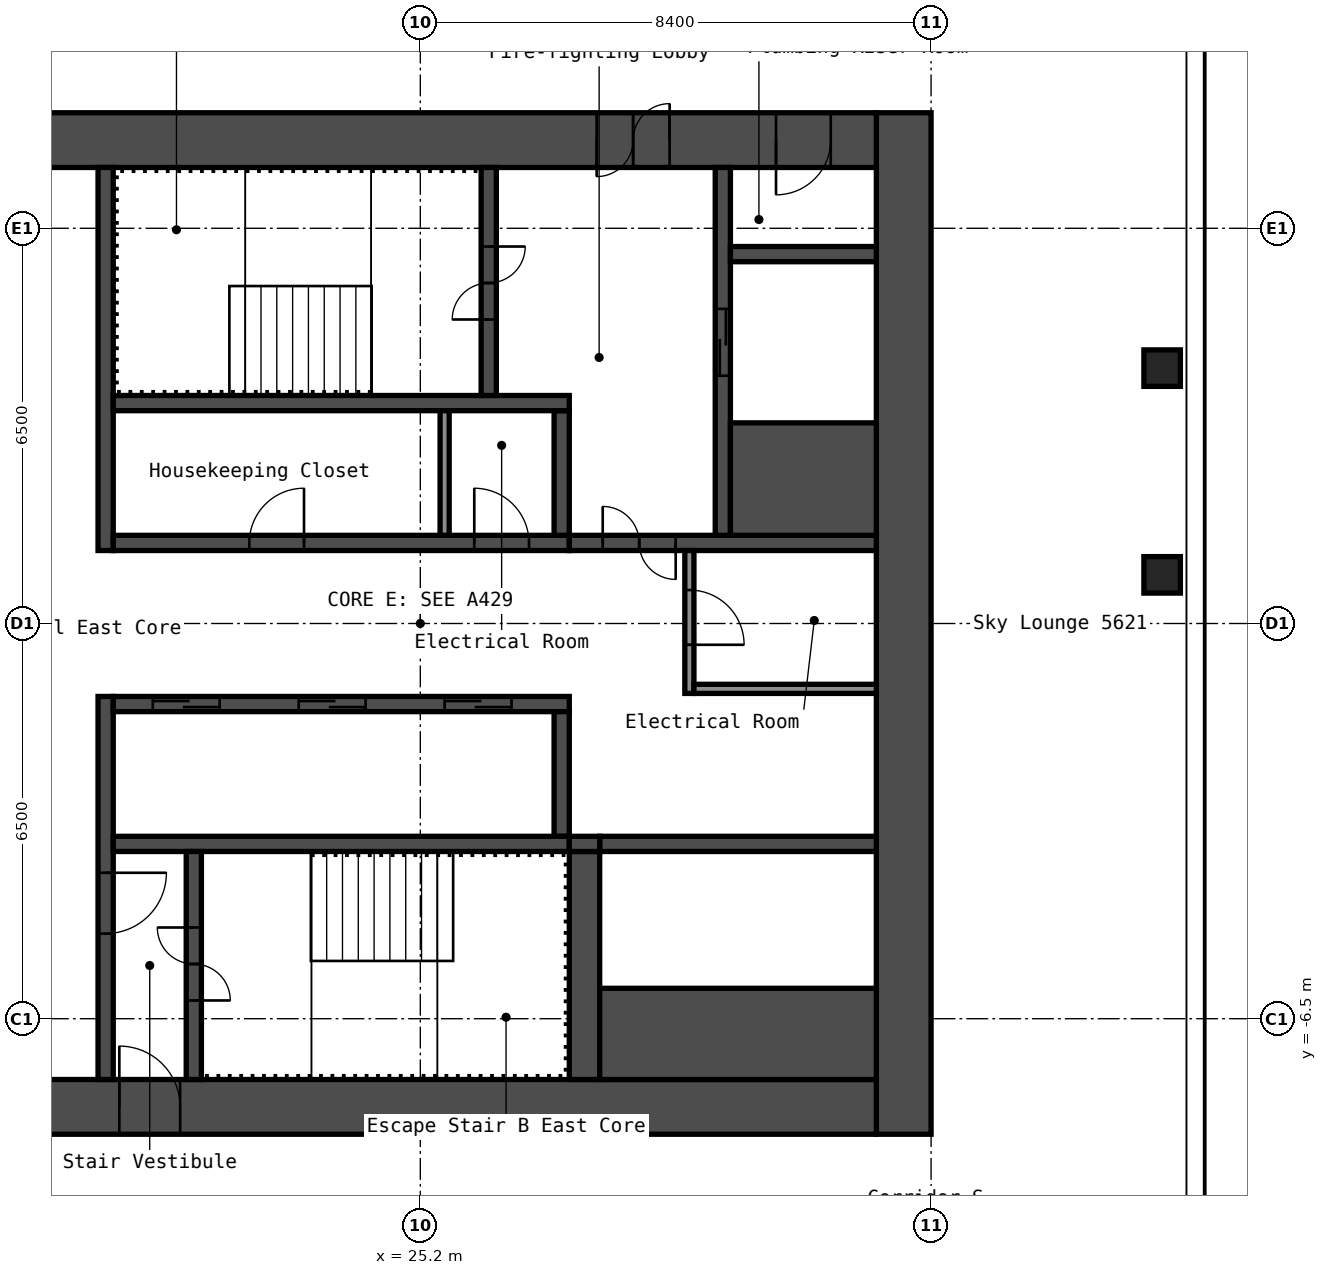
"""IFC4 building model, lengths in metres.
Left out: names, types, materials, properties, quantities, classifications, styles, units other than length and angle.
Written with IfcOpenShell. Run it as: python <this file> out.ifc"""

import sys

from ifc_helpers import new_model, si_unit, direction, frame, frame_2d, origin, origin_2d, place, context, subcontext, project, spatial, rectangle, hollow_rectangle, extrude, element, fill, save


model = new_model("IFC4")
c1 = context("Model", 3, precision=1e-05, world=origin(), true_north=direction((0.0, 1.0)))
c2 = subcontext(c1, "Body", "Model", "MODEL_VIEW")
j1 = project(units=[si_unit("LENGTHUNIT", "METRE"), si_unit("PLANEANGLEUNIT", "RADIAN")], contexts=[c1])
p1 = place(None, origin())
s1 = spatial("IfcSite", under=j1, at=p1, CompositionType="ELEMENT")
p2 = place(p1, origin())
s2 = spatial("IfcBuilding", under=s1, at=p2, CompositionType="ELEMENT")
p3 = place(p2, frame((0.0, 0.0, 199.4)))
s3 = spatial("IfcBuildingStorey", under=s2, at=p3, CompositionType="ELEMENT", Elevation=199.4)
for number, where, z_axis, x_axis in (
    (1, (37.4, 0.8, 0.0), (0.0, 0.0, 1.0), (1.0, 0.0, 0.0)),
    (2, (37.4, 4.2, 0.0), (0.0, 0.0, 1.0), (1.0, 0.0, 0.0)),
):
    element("IfcColumn", number, at=place(p3, frame(where, z_axis=z_axis, x_axis=x_axis)), inside=s3, PredefinedType="COLUMN", context=c2, shape_type="SweptSolid", body=[
        extrude(hollow_rectangle(XDim=0.6, YDim=0.6, WallThickness=0.025, InnerFilletRadius=0.038, OuterFilletRadius=0.062, at=origin_2d()), origin(), (0.0, 0.0, 1.0), 2.75),
    ])
p4 = place(p3, frame((33.15, -8.4, 0.0), z_axis=(0.0, 0.0, 1.0), x_axis=(0.0, 1.0, 0.0)))
e3 = element("IfcWall", 3, at=p4, inside=s3, PredefinedType="SHEAR", context=c2, shape_type="SweptSolid", body=[
    extrude(rectangle(XDim=16.8, YDim=0.9, at=frame_2d((8.4, 0.0))), origin(), (0.0, 0.0, 1.0), 2.75),
])
p5 = place(p3, frame((17.7, 7.95, 0.0), z_axis=(0.0, 0.0, 1.0), x_axis=(1.0, 0.0, 0.0)))
e4 = element("IfcWall", 4, at=p5, inside=s3, PredefinedType="SHEAR", context=c2, shape_type="SweptSolid", body=[
    extrude(rectangle(XDim=15.0, YDim=0.9, at=frame_2d((7.5, 0.0))), origin(), (0.0, 0.0, 1.0), 2.75),
])
p6 = place(p5, frame((10.4, 0.0, 0.0)))
e5 = element("IfcOpeningElement", 5, at=p6, cuts=e4, PredefinedType="OPENING", context=c2, shape_type="SweptSolid", body=[
    extrude(rectangle(XDim=1.2, YDim=2.1, at=frame_2d((0.6, 1.05))), frame((0.0, 0.46, 0.0), z_axis=(0.0, -1.0, 0.0), x_axis=(1.0, 0.0, 0.0)), (0.0, 0.0, 1.0), 0.92),
])
p7 = place(p5, frame((13.35, 0.0, 0.0)))
e6 = element("IfcOpeningElement", 6, at=p7, cuts=e4, PredefinedType="OPENING", context=c2, shape_type="SweptSolid", body=[
    extrude(rectangle(XDim=0.9, YDim=2.1, at=frame_2d((0.45, 1.05))), frame((0.0, 0.46, 0.0), z_axis=(0.0, -1.0, 0.0), x_axis=(1.0, 0.0, 0.0)), (0.0, 0.0, 1.0), 0.92),
])
p8 = place(p3, frame((17.7, -7.95, 0.0), z_axis=(0.0, 0.0, 1.0), x_axis=(1.0, 0.0, 0.0)))
e7 = element("IfcWall", 7, at=p8, inside=s3, PredefinedType="SHEAR", context=c2, shape_type="SweptSolid", body=[
    extrude(rectangle(XDim=15.0, YDim=0.9, at=frame_2d((7.5, 0.0))), origin(), (0.0, 0.0, 1.0), 2.75),
])
p9 = place(p8, frame((2.55, 0.0, 0.0)))
e8 = element("IfcOpeningElement", 8, at=p9, cuts=e7, PredefinedType="OPENING", context=c2, shape_type="SweptSolid", body=[
    extrude(rectangle(XDim=1.0, YDim=2.1, at=frame_2d((0.5, 1.05))), frame((0.0, 0.46, 0.0), z_axis=(0.0, -1.0, 0.0), x_axis=(1.0, 0.0, 0.0)), (0.0, 0.0, 1.0), 0.92),
])
p10 = place(p3, frame((20.025, 1.2, 0.0), z_axis=(0.0, 0.0, 1.0), x_axis=(0.0, 1.0, 0.0)))
e9 = element("IfcWall", 9, at=p10, inside=s3, PredefinedType="SHEAR", context=c2, shape_type="SweptSolid", body=[
    extrude(rectangle(XDim=6.3, YDim=0.25, at=frame_2d((3.15, 0.0))), origin(), (0.0, 0.0, 1.0), 2.75),
])
p11 = place(p3, frame((20.025, -7.5, 0.0), z_axis=(0.0, 0.0, 1.0), x_axis=(0.0, 1.0, 0.0)))
e10 = element("IfcWall", 10, at=p11, inside=s3, PredefinedType="SHEAR", context=c2, shape_type="SweptSolid", body=[
    extrude(rectangle(XDim=6.3, YDim=0.25, at=frame_2d((3.15, 0.0))), origin(), (0.0, 0.0, 1.0), 2.75),
])
p12 = place(p11, frame((2.4, 0.0, 0.0)))
e11 = element("IfcOpeningElement", 11, at=p12, cuts=e10, PredefinedType="OPENING", context=c2, shape_type="SweptSolid", body=[
    extrude(rectangle(XDim=1.0, YDim=2.1, at=frame_2d((0.5, 1.05))), frame((0.0, 0.135, 0.0), z_axis=(0.0, -1.0, 0.0), x_axis=(1.0, 0.0, 0.0)), (0.0, 0.0, 1.0), 0.27),
])
p13 = place(p3, frame((20.15, 1.325, 0.0), z_axis=(0.0, 0.0, 1.0), x_axis=(1.0, 0.0, 0.0)))
e12 = element("IfcWall", 12, at=p13, inside=s3, PredefinedType="SHEAR", context=c2, shape_type="SweptSolid", body=[
    extrude(rectangle(XDim=7.5, YDim=0.25, at=frame_2d((3.75, 0.0))), origin(), (0.0, 0.0, 1.0), 2.75),
])
p14 = place(p13, frame((2.238, 0.0, 0.0)))
e13 = element("IfcOpeningElement", 13, at=p14, cuts=e12, PredefinedType="OPENING", context=c2, shape_type="SweptSolid", body=[
    extrude(rectangle(XDim=0.9, YDim=2.1, at=frame_2d((0.45, 1.05))), frame((0.0, 0.135, 0.0), z_axis=(0.0, -1.0, 0.0), x_axis=(1.0, 0.0, 0.0)), (0.0, 0.0, 1.0), 0.27),
])
p15 = place(p13, frame((5.938, 0.0, 0.0)))
e14 = element("IfcOpeningElement", 14, at=p15, cuts=e12, PredefinedType="OPENING", context=c2, shape_type="SweptSolid", body=[
    extrude(rectangle(XDim=0.9, YDim=2.1, at=frame_2d((0.45, 1.05))), frame((0.0, 0.135, 0.0), z_axis=(0.0, -1.0, 0.0), x_axis=(1.0, 0.0, 0.0)), (0.0, 0.0, 1.0), 0.27),
])
p16 = place(p3, frame((27.525, 1.45, 0.0), z_axis=(0.0, 0.0, 1.0), x_axis=(0.0, 1.0, 0.0)))
e15 = element("IfcWall", 15, at=p16, inside=s3, PredefinedType="SHEAR", context=c2, shape_type="SweptSolid", body=[
    extrude(rectangle(XDim=2.05, YDim=0.25, at=frame_2d((1.025, 0.0))), origin(), (0.0, 0.0, 1.0), 2.75),
])
p17 = place(p3, frame((20.15, 3.625, 0.0), z_axis=(0.0, 0.0, 1.0), x_axis=(1.0, 0.0, 0.0)))
e16 = element("IfcWall", 16, at=p17, inside=s3, PredefinedType="SHEAR", context=c2, shape_type="SweptSolid", body=[
    extrude(rectangle(XDim=7.5, YDim=0.25, at=frame_2d((3.75, 0.0))), origin(), (0.0, 0.0, 1.0), 2.75),
])
p18 = place(p3, frame((26.325, 3.75, 0.0), z_axis=(0.0, 0.0, 1.0), x_axis=(0.0, 1.0, 0.0)))
e17 = element("IfcWall", 17, at=p18, inside=s3, PredefinedType="SHEAR", context=c2, shape_type="SweptSolid", body=[
    extrude(rectangle(XDim=3.75, YDim=0.25, at=frame_2d((1.875, 0.0))), origin(), (0.0, 0.0, 1.0), 2.75),
])
p19 = place(p18, frame((1.25, 0.0, 0.0)))
e18 = element("IfcOpeningElement", 18, at=p19, cuts=e17, PredefinedType="OPENING", context=c2, shape_type="SweptSolid", body=[
    extrude(rectangle(XDim=1.2, YDim=2.1, at=frame_2d((0.6, 1.05))), frame((0.0, 0.135, 0.0), z_axis=(0.0, -1.0, 0.0), x_axis=(1.0, 0.0, 0.0)), (0.0, 0.0, 1.0), 0.27),
])
p20 = place(p3, frame((27.65, 1.325, 0.0), z_axis=(0.0, 0.0, 1.0), x_axis=(1.0, 0.0, 0.0)))
e19 = element("IfcWall", 19, at=p20, inside=s3, PredefinedType="SHEAR", context=c2, shape_type="SweptSolid", body=[
    extrude(rectangle(XDim=5.05, YDim=0.25, at=frame_2d((2.525, 0.0))), origin(), (0.0, 0.0, 1.0), 2.75),
])
p21 = place(p20, frame((0.55, 0.0, 0.0)))
e20 = element("IfcOpeningElement", 20, at=p21, cuts=e19, PredefinedType="OPENING", context=c2, shape_type="SweptSolid", body=[
    extrude(rectangle(XDim=1.2, YDim=2.1, at=frame_2d((0.6, 1.05))), frame((0.0, 0.135, 0.0), z_axis=(0.0, -1.0, 0.0), x_axis=(1.0, 0.0, 0.0)), (0.0, 0.0, 1.0), 0.27),
])
p22 = place(p3, frame((30.175, 1.45, 0.0), z_axis=(0.0, 0.0, 1.0), x_axis=(0.0, 1.0, 0.0)))
e21 = element("IfcWall", 21, at=p22, inside=s3, PredefinedType="SHEAR", context=c2, shape_type="SweptSolid", body=[
    extrude(rectangle(XDim=6.05, YDim=0.25, at=frame_2d((3.025, 0.0))), origin(), (0.0, 0.0, 1.0), 2.75),
])
p23 = place(p22, frame((2.625, 0.0, 0.0)))
e22 = element("IfcOpeningElement", 22, at=p23, cuts=e21, PredefinedType="OPENING", context=c2, shape_type="SweptSolid", body=[
    extrude(rectangle(XDim=1.1, YDim=2.1, at=frame_2d((0.55, 1.05))), frame((0.0, 0.135, 0.0), z_axis=(0.0, -1.0, 0.0), x_axis=(1.0, 0.0, 0.0)), (0.0, 0.0, 1.0), 0.27),
])
p24 = place(p3, frame((30.3, 2.375, 0.0), z_axis=(0.0, 0.0, 1.0), x_axis=(1.0, 0.0, 0.0)))
e23 = element("IfcWall", 23, at=p24, inside=s3, PredefinedType="SHEAR", context=c2, shape_type="SweptSolid", body=[
    extrude(rectangle(XDim=2.4, YDim=1.85, at=frame_2d((1.2, 0.0))), origin(), (0.0, 0.0, 1.0), 2.75),
])
p25 = place(p3, frame((30.3, 6.075, 0.0), z_axis=(0.0, 0.0, 1.0), x_axis=(1.0, 0.0, 0.0)))
e24 = element("IfcWall", 24, at=p25, inside=s3, PredefinedType="SHEAR", context=c2, shape_type="SweptSolid", body=[
    extrude(rectangle(XDim=2.4, YDim=0.25, at=frame_2d((1.2, 0.0))), origin(), (0.0, 0.0, 1.0), 2.75),
])
p26 = place(p3, frame((20.15, -1.325, 0.0), z_axis=(0.0, 0.0, 1.0), x_axis=(1.0, 0.0, 0.0)))
e25 = element("IfcWall", 25, at=p26, inside=s3, PredefinedType="SHEAR", context=c2, shape_type="SweptSolid", body=[
    extrude(rectangle(XDim=7.5, YDim=0.25, at=frame_2d((3.75, 0.0))), origin(), (0.0, 0.0, 1.0), 2.75),
])
p27 = place(p26, frame((0.65, 0.0, 0.0)))
e26 = element("IfcOpeningElement", 26, at=p27, cuts=e25, PredefinedType="OPENING", context=c2, shape_type="SweptSolid", body=[
    extrude(rectangle(XDim=1.1, YDim=2.1, at=frame_2d((0.55, 1.05))), frame((0.0, 0.135, 0.0), z_axis=(0.0, -1.0, 0.0), x_axis=(1.0, 0.0, 0.0)), (0.0, 0.0, 1.0), 0.27),
])
p28 = place(p26, frame((3.05, 0.0, 0.0)))
e27 = element("IfcOpeningElement", 27, at=p28, cuts=e25, PredefinedType="OPENING", context=c2, shape_type="SweptSolid", body=[
    extrude(rectangle(XDim=1.1, YDim=2.1, at=frame_2d((0.55, 1.05))), frame((0.0, 0.135, 0.0), z_axis=(0.0, -1.0, 0.0), x_axis=(1.0, 0.0, 0.0)), (0.0, 0.0, 1.0), 0.27),
])
p29 = place(p26, frame((5.45, 0.0, 0.0)))
e28 = element("IfcOpeningElement", 28, at=p29, cuts=e25, PredefinedType="OPENING", context=c2, shape_type="SweptSolid", body=[
    extrude(rectangle(XDim=1.1, YDim=2.1, at=frame_2d((0.55, 1.05))), frame((0.0, 0.135, 0.0), z_axis=(0.0, -1.0, 0.0), x_axis=(1.0, 0.0, 0.0)), (0.0, 0.0, 1.0), 0.27),
])
p30 = place(p3, frame((27.525, -3.5, 0.0), z_axis=(0.0, 0.0, 1.0), x_axis=(0.0, 1.0, 0.0)))
e29 = element("IfcWall", 29, at=p30, inside=s3, PredefinedType="SHEAR", context=c2, shape_type="SweptSolid", body=[
    extrude(rectangle(XDim=2.05, YDim=0.25, at=frame_2d((1.025, 0.0))), origin(), (0.0, 0.0, 1.0), 2.75),
])
p31 = place(p3, frame((20.15, -3.625, 0.0), z_axis=(0.0, 0.0, 1.0), x_axis=(1.0, 0.0, 0.0)))
e30 = element("IfcWall", 30, at=p31, inside=s3, PredefinedType="SHEAR", context=c2, shape_type="SweptSolid", body=[
    extrude(rectangle(XDim=7.5, YDim=0.25, at=frame_2d((3.75, 0.0))), origin(), (0.0, 0.0, 1.0), 2.75),
])
p32 = place(p3, frame((21.475, -7.5, 0.0), z_axis=(0.0, 0.0, 1.0), x_axis=(0.0, 1.0, 0.0)))
e31 = element("IfcWall", 31, at=p32, inside=s3, PredefinedType="SHEAR", context=c2, shape_type="SweptSolid", body=[
    extrude(rectangle(XDim=3.75, YDim=0.25, at=frame_2d((1.875, 0.0))), origin(), (0.0, 0.0, 1.0), 2.75),
])
p33 = place(p32, frame((1.3, 0.0, 0.0)))
e32 = element("IfcOpeningElement", 32, at=p33, cuts=e31, PredefinedType="OPENING", context=c2, shape_type="SweptSolid", body=[
    extrude(rectangle(XDim=1.2, YDim=2.1, at=frame_2d((0.6, 1.05))), frame((0.0, 0.135, 0.0), z_axis=(0.0, -1.0, 0.0), x_axis=(1.0, 0.0, 0.0)), (0.0, 0.0, 1.0), 0.27),
])
p34 = place(p3, frame((27.9, -7.5, 0.0), z_axis=(0.0, 0.0, 1.0), x_axis=(0.0, 1.0, 0.0)))
e33 = element("IfcWall", 33, at=p34, inside=s3, PredefinedType="SHEAR", context=c2, shape_type="SweptSolid", body=[
    extrude(rectangle(XDim=3.75, YDim=0.5, at=frame_2d((1.875, 0.0))), origin(), (0.0, 0.0, 1.0), 2.75),
])
p35 = place(p3, frame((28.15, -3.625, 0.0), z_axis=(0.0, 0.0, 1.0), x_axis=(1.0, 0.0, 0.0)))
e34 = element("IfcWall", 34, at=p35, inside=s3, PredefinedType="SHEAR", context=c2, shape_type="SweptSolid", body=[
    extrude(rectangle(XDim=4.55, YDim=0.25, at=frame_2d((2.275, 0.0))), origin(), (0.0, 0.0, 1.0), 2.75),
])
p36 = place(p3, frame((28.15, -6.75, 0.0), z_axis=(0.0, 0.0, 1.0), x_axis=(1.0, 0.0, 0.0)))
e35 = element("IfcWall", 35, at=p36, inside=s3, PredefinedType="SHEAR", context=c2, shape_type="SweptSolid", body=[
    extrude(rectangle(XDim=4.55, YDim=1.5, at=frame_2d((2.275, 0.0))), origin(), (0.0, 0.0, 1.0), 2.75),
])
p37 = place(p3, frame((27.65, -3.625, 0.0), z_axis=(0.0, 0.0, 1.0), x_axis=(1.0, 0.0, 0.0)))
e36 = element("IfcWall", 36, at=p37, inside=s3, PredefinedType="SHEAR", context=c2, shape_type="SweptSolid", body=[
    extrude(rectangle(XDim=0.5, YDim=0.25, at=frame_2d((0.25, 0.0))), origin(), (0.0, 0.0, 1.0), 2.75),
])
p38 = place(p3, frame((29.625, -1.15, 0.0), z_axis=(0.0, 0.0, 1.0), x_axis=(0.0, 1.0, 0.0)))
e37 = element("IfcWall", 37, at=p38, inside=s3, PredefinedType="PARTITIONING", context=c2, shape_type="SweptSolid", body=[
    extrude(rectangle(XDim=2.35, YDim=0.15, at=frame_2d((1.175, 0.0))), origin(), (0.0, 0.0, 1.0), 2.75),
])
p39 = place(p38, frame((0.8, 0.0, 0.0)))
e38 = element("IfcOpeningElement", 38, at=p39, cuts=e37, PredefinedType="OPENING", context=c2, shape_type="SweptSolid", body=[
    extrude(rectangle(XDim=0.9, YDim=2.1, at=frame_2d((0.45, 1.05))), frame((0.0, 0.085, 0.0), z_axis=(0.0, -1.0, 0.0), x_axis=(1.0, 0.0, 0.0)), (0.0, 0.0, 1.0), 0.17),
])
p40 = place(p3, frame((29.7, -1.075, 0.0), z_axis=(0.0, 0.0, 1.0), x_axis=(1.0, 0.0, 0.0)))
e39 = element("IfcWall", 39, at=p40, inside=s3, PredefinedType="PARTITIONING", context=c2, shape_type="SweptSolid", body=[
    extrude(rectangle(XDim=3.0, YDim=0.15, at=frame_2d((1.5, 0.0))), origin(), (0.0, 0.0, 1.0), 2.75),
])
p41 = place(p3, frame((25.6, 1.45, 0.0), z_axis=(0.0, 0.0, 1.0), x_axis=(0.0, 1.0, 0.0)))
e40 = element("IfcWall", 40, at=p41, inside=s3, PredefinedType="PARTITIONING", context=c2, shape_type="SweptSolid", body=[
    extrude(rectangle(XDim=2.05, YDim=0.15, at=frame_2d((1.025, 0.0))), origin(), (0.0, 0.0, 1.0), 2.75),
])
p42 = place(p6, origin())
e41 = element("IfcDoor", 41, at=p42, inside=s3, OperationType="DOUBLE_DOOR_SINGLE_SWING", PredefinedType="DOOR", context=c2, shape_type="SweptSolid", body=[
    extrude(rectangle(XDim=1.2, YDim=2.1, at=frame_2d((0.6, 1.05))), frame((0.0, 0.025, 0.0), z_axis=(0.0, -1.0, 0.0), x_axis=(1.0, 0.0, 0.0)), (0.0, 0.0, 1.0), 0.05),
])
fill(e5, e41)
p43 = place(p7, origin())
e42 = element("IfcDoor", 42, at=p43, inside=s3, OperationType="SINGLE_SWING_LEFT", PredefinedType="DOOR", context=c2, shape_type="SweptSolid", body=[
    extrude(rectangle(XDim=0.9, YDim=2.1, at=frame_2d((0.45, 1.05))), frame((0.0, 0.025, 0.0), z_axis=(0.0, -1.0, 0.0), x_axis=(1.0, 0.0, 0.0)), (0.0, 0.0, 1.0), 0.05),
])
fill(e6, e42)
p44 = place(p9, origin())
e43 = element("IfcDoor", 43, at=p44, inside=s3, OperationType="SINGLE_SWING_RIGHT", PredefinedType="DOOR", context=c2, shape_type="SweptSolid", body=[
    extrude(rectangle(XDim=1.0, YDim=2.1, at=frame_2d((0.5, 1.05))), frame((0.0, 0.025, 0.0), z_axis=(0.0, -1.0, 0.0), x_axis=(1.0, 0.0, 0.0)), (0.0, 0.0, 1.0), 0.05),
])
fill(e8, e43)
p45 = place(p19, origin())
e44 = element("IfcDoor", 44, at=p45, inside=s3, OperationType="DOUBLE_DOOR_SINGLE_SWING", PredefinedType="DOOR", context=c2, shape_type="SweptSolid", body=[
    extrude(rectangle(XDim=1.2, YDim=2.1, at=frame_2d((0.6, 1.05))), frame((0.0, 0.025, 0.0), z_axis=(0.0, -1.0, 0.0), x_axis=(1.0, 0.0, 0.0)), (0.0, 0.0, 1.0), 0.05),
])
fill(e18, e44)
p46 = place(p33, origin())
e45 = element("IfcDoor", 45, at=p46, inside=s3, OperationType="DOUBLE_DOOR_SINGLE_SWING", PredefinedType="DOOR", context=c2, shape_type="SweptSolid", body=[
    extrude(rectangle(XDim=1.2, YDim=2.1, at=frame_2d((0.6, 1.05))), frame((0.0, 0.025, 0.0), z_axis=(0.0, -1.0, 0.0), x_axis=(1.0, 0.0, 0.0)), (0.0, 0.0, 1.0), 0.05),
])
fill(e32, e45)
p47 = place(p12, origin())
e46 = element("IfcDoor", 46, at=p47, inside=s3, OperationType="SINGLE_SWING_RIGHT", PredefinedType="DOOR", context=c2, shape_type="SweptSolid", body=[
    extrude(rectangle(XDim=1.0, YDim=2.1, at=frame_2d((0.5, 1.05))), frame((0.0, 0.025, 0.0), z_axis=(0.0, -1.0, 0.0), x_axis=(1.0, 0.0, 0.0)), (0.0, 0.0, 1.0), 0.05),
])
fill(e11, e46)
p48 = place(p21, origin())
e47 = element("IfcDoor", 47, at=p48, inside=s3, OperationType="DOUBLE_DOOR_SINGLE_SWING", PredefinedType="DOOR", context=c2, shape_type="SweptSolid", body=[
    extrude(rectangle(XDim=1.2, YDim=2.1, at=frame_2d((0.6, 1.05))), frame((0.0, 0.025, 0.0), z_axis=(0.0, -1.0, 0.0), x_axis=(1.0, 0.0, 0.0)), (0.0, 0.0, 1.0), 0.05),
])
fill(e20, e47)
p49 = place(p39, origin())
e48 = element("IfcDoor", 48, at=p49, inside=s3, OperationType="SINGLE_SWING_LEFT", PredefinedType="DOOR", context=c2, shape_type="SweptSolid", body=[
    extrude(rectangle(XDim=0.9, YDim=2.1, at=frame_2d((0.45, 1.05))), frame((0.0, 0.025, 0.0), z_axis=(0.0, -1.0, 0.0), x_axis=(1.0, 0.0, 0.0)), (0.0, 0.0, 1.0), 0.05),
])
fill(e38, e48)
p50 = place(p14, origin())
e49 = element("IfcDoor", 49, at=p50, inside=s3, OperationType="SINGLE_SWING_LEFT", PredefinedType="DOOR", context=c2, shape_type="SweptSolid", body=[
    extrude(rectangle(XDim=0.9, YDim=2.1, at=frame_2d((0.45, 1.05))), frame((0.0, 0.025, 0.0), z_axis=(0.0, -1.0, 0.0), x_axis=(1.0, 0.0, 0.0)), (0.0, 0.0, 1.0), 0.05),
])
fill(e13, e49)
p51 = place(p15, origin())
e50 = element("IfcDoor", 50, at=p51, inside=s3, OperationType="SINGLE_SWING_RIGHT", PredefinedType="DOOR", context=c2, shape_type="SweptSolid", body=[
    extrude(rectangle(XDim=0.9, YDim=2.1, at=frame_2d((0.45, 1.05))), frame((0.0, 0.025, 0.0), z_axis=(0.0, -1.0, 0.0), x_axis=(1.0, 0.0, 0.0)), (0.0, 0.0, 1.0), 0.05),
])
fill(e14, e50)
p52 = place(p27, origin())
e51 = element("IfcDoor", 51, at=p52, inside=s3, OperationType="DOUBLE_DOOR_SLIDING", PredefinedType="DOOR", context=c2, shape_type="SweptSolid", body=[
    extrude(rectangle(XDim=1.1, YDim=2.1, at=frame_2d((0.55, 1.05))), frame((0.0, 0.025, 0.0), z_axis=(0.0, -1.0, 0.0), x_axis=(1.0, 0.0, 0.0)), (0.0, 0.0, 1.0), 0.05),
])
fill(e26, e51)
p53 = place(p28, origin())
e52 = element("IfcDoor", 52, at=p53, inside=s3, OperationType="DOUBLE_DOOR_SLIDING", PredefinedType="DOOR", context=c2, shape_type="SweptSolid", body=[
    extrude(rectangle(XDim=1.1, YDim=2.1, at=frame_2d((0.55, 1.05))), frame((0.0, 0.025, 0.0), z_axis=(0.0, -1.0, 0.0), x_axis=(1.0, 0.0, 0.0)), (0.0, 0.0, 1.0), 0.05),
])
fill(e27, e52)
p54 = place(p29, origin())
e53 = element("IfcDoor", 53, at=p54, inside=s3, OperationType="DOUBLE_DOOR_SLIDING", PredefinedType="DOOR", context=c2, shape_type="SweptSolid", body=[
    extrude(rectangle(XDim=1.1, YDim=2.1, at=frame_2d((0.55, 1.05))), frame((0.0, 0.025, 0.0), z_axis=(0.0, -1.0, 0.0), x_axis=(1.0, 0.0, 0.0)), (0.0, 0.0, 1.0), 0.05),
])
fill(e28, e53)
p55 = place(p23, origin())
e54 = element("IfcDoor", 54, at=p55, inside=s3, OperationType="DOUBLE_DOOR_SLIDING", PredefinedType="DOOR", context=c2, shape_type="SweptSolid", body=[
    extrude(rectangle(XDim=1.1, YDim=2.1, at=frame_2d((0.55, 1.05))), frame((0.0, 0.025, 0.0), z_axis=(0.0, -1.0, 0.0), x_axis=(1.0, 0.0, 0.0)), (0.0, 0.0, 1.0), 0.05),
])
fill(e22, e54)
save(model, sys.argv[1])
